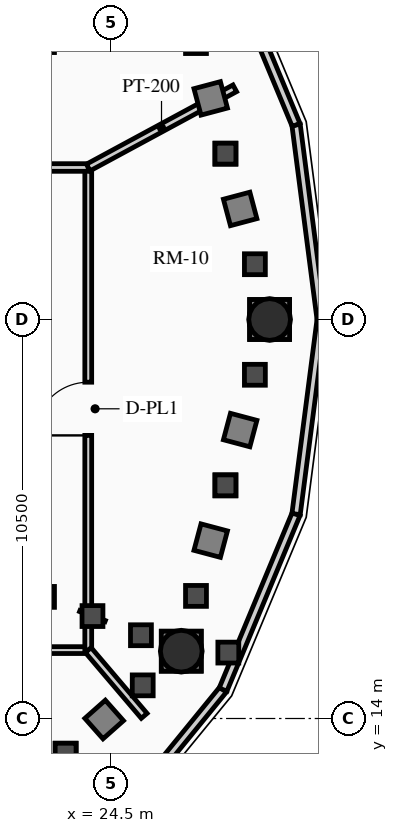
"""IFC4 building model, lengths in metres.
Left out: names, types, materials, properties, quantities, classifications, styles, units other than length and angle.
Written with IfcOpenShell. Run it as: python <this file> out.ifc"""

import sys

from ifc_helpers import new_model, si_unit, direction, frame, frame_2d, origin, origin_2d, place, context, subcontext, project, spatial, rectangle, circle, extrude, source, transform, mapped, element, fill, save


model = new_model("IFC4")
c1 = context("Model", 3, precision=1e-05, world=origin(), true_north=direction((0.0, 1.0)))
c2 = subcontext(c1, "Body", "Model", "MODEL_VIEW")
j1 = project(units=[si_unit("LENGTHUNIT", "METRE"), si_unit("PLANEANGLEUNIT", "RADIAN")], contexts=[c1])
p1 = place(None, origin())
s1 = spatial("IfcSite", under=j1, at=p1, CompositionType="ELEMENT")
p2 = place(p1, origin())
s2 = spatial("IfcBuilding", under=s1, at=p2, CompositionType="ELEMENT")
p3 = place(p2, frame((0.0, 0.0, 192.34)))
s3 = spatial("IfcBuildingStorey", under=s2, at=p3, CompositionType="ELEMENT", Elevation=192.34)
for number, where, z_axis, x_axis in (
    (1, (28.672, 24.5, 0.0), (0.0, 0.0, 1.0), (1.0, 0.0, 0.0)),
    (2, (26.347, 15.771, 0.0), (0.0, 0.0, 1.0), (1.0, 0.0, 0.0)),
):
    element("IfcColumn", number, at=place(p3, frame(where, z_axis=z_axis, x_axis=x_axis)), inside=s3, PredefinedType="USERDEFINED", context=c2, shape_type="SweptSolid", body=[
        extrude(circle(Radius=0.55, at=origin_2d()), origin(), (0.0, 0.0, 1.0), 4.32),
    ])
p4 = place(p3, frame((29.369, 29.62, 0.0), z_axis=(0.0, 0.0, 1.0), x_axis=(0.128287912609, -0.991736966881, 0.0)))
e3 = element("IfcWall", 3, at=p4, inside=s3, PredefinedType="SOLIDWALL", context=c2, shape_type="SweptSolid", body=[
    extrude(rectangle(XDim=5.163, YDim=0.22, at=frame_2d((2.582, 0.0))), origin(), (0.0, 0.0, 1.0), 4.095),
])
p5 = place(p3, frame((27.447, 34.24, 0.0), z_axis=(0.0, 0.0, 1.0), x_axis=(0.384144094086, -0.923273152961, 0.0)))
e4 = element("IfcWall", 4, at=p5, inside=s3, PredefinedType="SOLIDWALL", context=c2, shape_type="SweptSolid", body=[
    extrude(rectangle(XDim=5.003, YDim=0.22, at=frame_2d((2.501, 0.0))), origin(), (0.0, 0.0, 1.0), 4.095),
])
p6 = place(p3, frame((27.447, 14.76, 0.0), z_axis=(0.0, 0.0, 1.0), x_axis=(-0.632470615287, -0.774584353572, 0.0)))
e5 = element("IfcWall", 5, at=p6, inside=s3, PredefinedType="SOLIDWALL", context=c2, shape_type="SweptSolid", body=[
    extrude(rectangle(XDim=4.733, YDim=0.22, at=frame_2d((2.366, 0.0))), origin(), (0.0, 0.0, 1.0), 4.095),
])
p7 = place(p3, frame((29.369, 19.38, 0.0), z_axis=(0.0, 0.0, 1.0), x_axis=(-0.384144094086, -0.923273152961, 0.0)))
e6 = element("IfcWall", 6, at=p7, inside=s3, PredefinedType="SOLIDWALL", context=c2, shape_type="SweptSolid", body=[
    extrude(rectangle(XDim=5.003, YDim=0.22, at=frame_2d((2.501, 0.0))), origin(), (0.0, 0.0, 1.0), 4.095),
])
p8 = place(p3, frame((30.031, 24.5, 0.0), z_axis=(0.0, 0.0, 1.0), x_axis=(-0.128287912609, -0.991736966881, 0.0)))
e7 = element("IfcWall", 7, at=p8, inside=s3, PredefinedType="SOLIDWALL", context=c2, shape_type="SweptSolid", body=[
    extrude(rectangle(XDim=5.163, YDim=0.22, at=frame_2d((2.582, 0.0))), origin(), (0.0, 0.0, 1.0), 4.095),
])
p9 = place(p3, frame((9.1, 15.8, 0.0), z_axis=(0.0, 0.0, 1.0), x_axis=(1.0, 0.0, 0.0)))
e8 = element("IfcWall", 8, at=p9, inside=s3, PredefinedType="PARTITIONING", context=c2, shape_type="SweptSolid", body=[
    extrude(rectangle(XDim=14.8, YDim=0.18, at=frame_2d((7.4, 0.0))), origin(), (0.0, 0.0, 1.0), 3.386),
])
m1 = source(origin(), c2, "Body", "SweptSolid", [
    extrude(rectangle(XDim=1.4, YDim=2.02, at=frame_2d((0.7, 1.01))), frame((0.0, 0.1, 0.0), z_axis=(0.0, -1.0, 0.0), x_axis=(1.0, 0.0, 0.0)), (0.0, 0.0, 1.0), 0.2),
])
p10 = place(p9, frame((6.7, 0.0, 0.0)))
e9 = element("IfcOpeningElement", 9, at=p10, cuts=e8, PredefinedType="OPENING", context=c2, shape_type="MappedRepresentation", body=[
    mapped(m1, transform((0.0, 0.0, 0.0), x_axis=(1.0, 0.0, 0.0), y_axis=(0.0, 1.0, 0.0), z_axis=(0.0, 0.0, 1.0), scale=1.0)),
])
p11 = place(p3, frame((23.9, 15.8, 0.0), z_axis=(0.0, 0.0, 1.0), x_axis=(0.0, 1.0, 0.0)))
e10 = element("IfcWall", 10, at=p11, inside=s3, PredefinedType="PARTITIONING", context=c2, shape_type="SweptSolid", body=[
    extrude(rectangle(XDim=12.7, YDim=0.18, at=frame_2d((6.35, 0.0))), origin(), (0.0, 0.0, 1.0), 3.386),
])
p12 = place(p11, frame((5.65, 0.0, 0.0)))
e11 = element("IfcOpeningElement", 11, at=p12, cuts=e10, PredefinedType="OPENING", context=c2, shape_type="MappedRepresentation", body=[
    mapped(m1, transform((0.0, 0.0, 0.0), x_axis=(1.0, 0.0, 0.0), y_axis=(0.0, 1.0, 0.0), z_axis=(0.0, 0.0, 1.0), scale=1.0)),
])
p13 = place(p3, frame((22.05, 28.5, 0.0), z_axis=(0.0, 0.0, 1.0), x_axis=(1.0, 0.0, 0.0)))
e12 = element("IfcWall", 12, at=p13, inside=s3, PredefinedType="PARTITIONING", context=c2, shape_type="SweptSolid", body=[
    extrude(rectangle(XDim=1.85, YDim=0.2, at=frame_2d((0.925, 0.0))), origin(), (0.0, 0.0, 1.0), 4.095),
])
p14 = place(p3, frame((23.9, 28.5, 0.0), z_axis=(0.0, 0.0, 1.0), x_axis=(0.879711551958, 0.475507713242, 0.0)))
e13 = element("IfcWall", 13, at=p14, inside=s3, PredefinedType="PARTITIONING", context=c2, shape_type="SweptSolid", body=[
    extrude(rectangle(XDim=4.383, YDim=0.2, at=frame_2d((2.191, 0.0))), origin(), (0.0, 0.0, 1.0), 3.386),
])
p15 = place(p3, frame((23.9, 15.8, 0.0), z_axis=(0.0, 0.0, 1.0), x_axis=(0.647910417059, -0.761716542729, 0.0)))
e14 = element("IfcWall", 14, at=p15, inside=s3, PredefinedType="PARTITIONING", context=c2, shape_type="SweptSolid", body=[
    extrude(rectangle(XDim=2.272, YDim=0.2, at=frame_2d((1.136, 0.0))), origin(), (0.0, 0.0, 1.0), 3.466),
])
m2 = source(origin(), c2, "Body", "SweptSolid", [
    extrude(rectangle(XDim=1.4, YDim=2.02, at=frame_2d((0.7, 1.01))), frame((0.0, 0.025, 0.0), z_axis=(0.0, -1.0, 0.0), x_axis=(1.0, 0.0, 0.0)), (0.0, 0.0, 1.0), 0.05),
])
p16 = place(p12, origin())
e15 = element("IfcDoor", 15, at=p16, inside=s3, OperationType="SINGLE_SWING_LEFT", PredefinedType="DOOR", context=c2, shape_type="MappedRepresentation", body=[
    mapped(m2, transform((0.0, 0.0, 0.0), x_axis=(1.0, 0.0, 0.0), y_axis=(0.0, 1.0, 0.0), z_axis=(0.0, 0.0, 1.0), scale=1.0)),
])
fill(e11, e15)
save(model, sys.argv[1])
